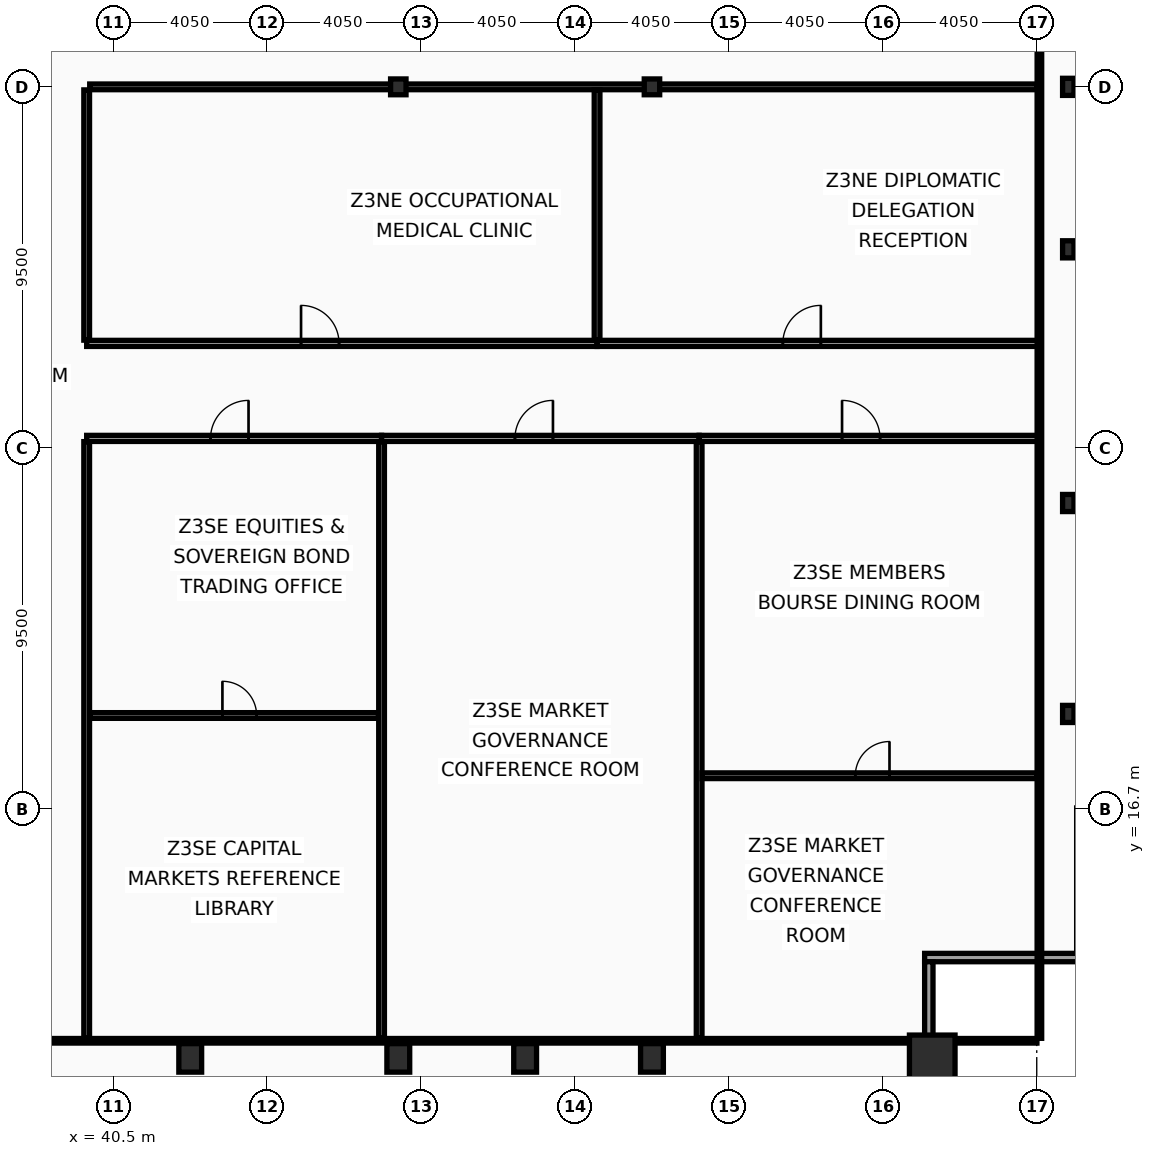
"""IFC4 building model, lengths in metres.
Left out: names, types, materials, properties, quantities, classifications, styles, units other than length and angle.
Written with IfcOpenShell. Run it as: python <this file> out.ifc"""

import sys

from ifc_helpers import new_model, si_unit, direction, frame, frame_2d, origin, origin_2d, place, context, subcontext, project, spatial, rectangle, hollow_rectangle, i_section, extrude, element, fill, save


model = new_model("IFC4")
c1 = context("Model", 3, precision=1e-05, world=origin(), true_north=direction((0.0, 1.0)))
c2 = subcontext(c1, "Body", "Model", "MODEL_VIEW")
j1 = project(units=[si_unit("LENGTHUNIT", "METRE"), si_unit("PLANEANGLEUNIT", "RADIAN")], contexts=[c1])
p1 = place(None, origin())
s1 = spatial("IfcSite", under=j1, at=p1, CompositionType="ELEMENT")
p2 = place(p1, origin())
s2 = spatial("IfcBuilding", under=s1, at=p2, CompositionType="ELEMENT")
p3 = place(p2, frame((0.0, 0.0, 199.4)))
s3 = spatial("IfcBuildingStorey", under=s2, at=p3, CompositionType="ELEMENT", Elevation=199.4)
p4 = place(p3, frame((62.05, 10.15, 0.0), z_axis=(0.0, 0.0, 1.0), x_axis=(1.0, 0.0, 0.0)))
e1 = element("IfcColumn", 1, at=p4, inside=s3, PredefinedType="COLUMN", context=c2, shape_type="SweptSolid", body=[
    extrude(hollow_rectangle(XDim=1.2, YDim=1.2, WallThickness=0.06, at=origin_2d()), origin(), (0.0, 0.0, 1.0), 3.6),
])
for number, where, z_axis, x_axis in (
    (2, (42.525, 10.15, 0.0), (0.0, 0.0, 1.0), (1.0, 0.0, 0.0)),
    (3, (48.0, 10.15, 0.0), (0.0, 0.0, 1.0), (1.0, 0.0, 0.0)),
    (4, (51.337, 10.15, 0.0), (0.0, 0.0, 1.0), (1.0, 0.0, 0.0)),
    (5, (54.675, 10.15, 0.0), (0.0, 0.0, 1.0), (1.0, 0.0, 0.0)),
):
    element("IfcColumn", number, at=place(p3, frame(where, z_axis=z_axis, x_axis=x_axis)), inside=s3, PredefinedType="COLUMN", context=c2, shape_type="SweptSolid", body=[
        extrude(hollow_rectangle(XDim=0.6, YDim=0.75, WallThickness=0.045, at=origin_2d()), origin(), (0.0, 0.0, 1.0), 3.6),
    ])
for number, where, z_axis, x_axis in (
    (6, (65.63, 19.2, 0.0), (0.0, 0.0, 1.0), (1.0, 0.0, 0.0)),
    (7, (65.63, 24.75, 0.0), (0.0, 0.0, 1.0), (1.0, 0.0, 0.0)),
    (8, (65.63, 31.425, 0.0), (0.0, 0.0, 1.0), (1.0, 0.0, 0.0)),
    (9, (65.63, 35.7, 0.0), (0.0, 0.0, 1.0), (1.0, 0.0, 0.0)),
):
    element("IfcColumn", number, at=place(p3, frame(where, z_axis=z_axis, x_axis=x_axis)), inside=s3, PredefinedType="COLUMN", context=c2, shape_type="SweptSolid", body=[
        extrude(i_section(OverallWidth=0.3, OverallDepth=0.45, WebThickness=0.014, FlangeThickness=0.026, at=origin_2d()), origin(), (0.0, 0.0, 1.0), 3.6),
    ])
for number, where, z_axis, x_axis in (
    (10, (48.0, 35.7, 0.0), (0.0, 0.0, 1.0), (1.0, 0.0, 0.0)),
    (11, (54.675, 35.7, 0.0), (0.0, 0.0, 1.0), (1.0, 0.0, 0.0)),
):
    element("IfcColumn", number, at=place(p3, frame(where, z_axis=z_axis, x_axis=x_axis)), inside=s3, PredefinedType="COLUMN", context=c2, shape_type="SweptSolid", body=[
        extrude(i_section(OverallWidth=0.406, OverallDepth=0.416, WebThickness=0.03, FlangeThickness=0.048, at=origin_2d()), origin(), (0.0, 0.0, 1.0), 3.6),
    ])
p5 = place(p3, frame((66.07, 12.79, 0.0), z_axis=(0.0, 0.0, 1.0), x_axis=(-1.0, 0.0, 0.0)))
e12 = element("IfcWall", 12, at=p5, inside=s3, PredefinedType="SOLIDWALL", context=c2, shape_type="SweptSolid", body=[
    extrude(rectangle(XDim=4.22, YDim=0.22, at=frame_2d((2.11, 0.0))), origin(), (0.0, 0.0, 1.0), 2.83),
])
p6 = place(p3, frame((61.96, 12.68, 0.0), z_axis=(0.0, 0.0, 1.0), x_axis=(0.0, -1.0, 0.0)))
e13 = element("IfcWall", 13, at=p6, inside=s3, PredefinedType="SOLIDWALL", context=c2, shape_type="SweptSolid", body=[
    extrude(rectangle(XDim=3.91, YDim=0.22, at=frame_2d((1.955, 0.0))), origin(), (0.0, 0.0, 1.0), 2.83),
])
p7 = place(p3, frame((39.8, 10.665, 0.0), z_axis=(0.0, 0.0, 1.0), x_axis=(0.0, 1.0, 0.0)))
e14 = element("IfcWall", 14, at=p7, inside=s3, PredefinedType="PARTITIONING", context=c2, shape_type="SweptSolid", body=[
    extrude(rectangle(XDim=15.7, YDim=0.15, at=frame_2d((7.85, 0.0))), origin(), (0.0, 0.0, 1.0), 2.98),
])
p8 = place(p3, frame((39.8, 29.035, 0.0), z_axis=(0.0, 0.0, 1.0), x_axis=(0.0, 1.0, 0.0)))
e15 = element("IfcWall", 15, at=p8, inside=s3, PredefinedType="PARTITIONING", context=c2, shape_type="SweptSolid", body=[
    extrude(rectangle(XDim=6.585, YDim=0.15, at=frame_2d((3.292, 0.0))), origin(), (0.0, 0.0, 1.0), 2.98),
])
p9 = place(p3, frame((39.88, 35.7, 0.0), z_axis=(0.0, 0.0, 1.0), x_axis=(1.0, 0.0, 0.0)))
e16 = element("IfcWall", 16, at=p9, inside=s3, PredefinedType="PARTITIONING", context=c2, shape_type="SweptSolid", body=[
    extrude(rectangle(XDim=24.925, YDim=0.15, at=frame_2d((12.462, 0.0))), origin(), (0.0, 0.0, 1.0), 2.73),
])
p10 = place(p3, frame((39.8, 26.45, 0.0), z_axis=(0.0, 0.0, 1.0), x_axis=(1.0, 0.0, 0.0)))
e17 = element("IfcWall", 17, at=p10, inside=s3, PredefinedType="PARTITIONING", context=c2, shape_type="SweptSolid", body=[
    extrude(rectangle(XDim=7.76, YDim=0.16, at=frame_2d((3.88, 0.0))), origin(), (0.0, 0.0, 1.0), 2.73),
])
p11 = place(p10, frame((3.259, 0.0, 0.0)))
e18 = element("IfcOpeningElement", 18, at=p11, cuts=e17, PredefinedType="OPENING", context=c2, shape_type="SweptSolid", body=[
    extrude(rectangle(XDim=1.0, YDim=2.05, at=frame_2d((0.5, 1.025))), frame((0.0, 0.09, 0.0), z_axis=(0.0, -1.0, 0.0), x_axis=(1.0, 0.0, 0.0)), (0.0, 0.0, 1.0), 0.18),
])
p12 = place(p3, frame((39.88, 19.159, 0.0), z_axis=(0.0, 0.0, 1.0), x_axis=(1.0, 0.0, 0.0)))
e19 = element("IfcWall", 19, at=p12, inside=s3, PredefinedType="PARTITIONING", context=c2, shape_type="SweptSolid", body=[
    extrude(rectangle(XDim=7.6, YDim=0.15, at=frame_2d((3.8, 0.0))), origin(), (0.0, 0.0, 1.0), 2.73),
])
p13 = place(p12, frame((3.492, 0.0, 0.0)))
e20 = element("IfcOpeningElement", 20, at=p13, cuts=e19, PredefinedType="OPENING", context=c2, shape_type="SweptSolid", body=[
    extrude(rectangle(XDim=0.9, YDim=2.05, at=frame_2d((0.45, 1.025))), frame((0.0, 0.085, 0.0), z_axis=(0.0, -1.0, 0.0), x_axis=(1.0, 0.0, 0.0)), (0.0, 0.0, 1.0), 0.17),
])
p14 = place(p3, frame((47.56, 26.45, 0.0), z_axis=(0.0, 0.0, 1.0), x_axis=(1.0, 0.0, 0.0)))
e21 = element("IfcWall", 21, at=p14, inside=s3, PredefinedType="PARTITIONING", context=c2, shape_type="SweptSolid", body=[
    extrude(rectangle(XDim=8.357, YDim=0.16, at=frame_2d((4.178, 0.0))), origin(), (0.0, 0.0, 1.0), 2.73),
])
p15 = place(p14, frame((3.51, 0.0, 0.0)))
e22 = element("IfcOpeningElement", 22, at=p15, cuts=e21, PredefinedType="OPENING", context=c2, shape_type="SweptSolid", body=[
    extrude(rectangle(XDim=1.0, YDim=2.05, at=frame_2d((0.5, 1.025))), frame((0.0, 0.09, 0.0), z_axis=(0.0, -1.0, 0.0), x_axis=(1.0, 0.0, 0.0)), (0.0, 0.0, 1.0), 0.18),
])
p16 = place(p3, frame((47.56, 10.665, 0.0), z_axis=(0.0, 0.0, 1.0), x_axis=(0.0, 1.0, 0.0)))
e23 = element("IfcWall", 23, at=p16, inside=s3, PredefinedType="PARTITIONING", context=c2, shape_type="SweptSolid", body=[
    extrude(rectangle(XDim=15.7, YDim=0.15, at=frame_2d((7.85, 0.0))), origin(), (0.0, 0.0, 1.0), 2.73),
])
p17 = place(p3, frame((55.917, 26.45, 0.0), z_axis=(0.0, 0.0, 1.0), x_axis=(1.0, 0.0, 0.0)))
e24 = element("IfcWall", 24, at=p17, inside=s3, PredefinedType="PARTITIONING", context=c2, shape_type="SweptSolid", body=[
    extrude(rectangle(XDim=8.954, YDim=0.16, at=frame_2d((4.477, 0.0))), origin(), (0.0, 0.0, 1.0), 3.44),
])
p18 = place(p17, frame((3.76, 0.0, 0.0)))
e25 = element("IfcOpeningElement", 25, at=p18, cuts=e24, PredefinedType="OPENING", context=c2, shape_type="SweptSolid", body=[
    extrude(rectangle(XDim=1.0, YDim=2.05, at=frame_2d((0.5, 1.025))), frame((0.0, 0.09, 0.0), z_axis=(0.0, -1.0, 0.0), x_axis=(1.0, 0.0, 0.0)), (0.0, 0.0, 1.0), 0.18),
])
p19 = place(p3, frame((55.917, 10.665, 0.0), z_axis=(0.0, 0.0, 1.0), x_axis=(0.0, 1.0, 0.0)))
e26 = element("IfcWall", 26, at=p19, inside=s3, PredefinedType="PARTITIONING", context=c2, shape_type="SweptSolid", body=[
    extrude(rectangle(XDim=15.7, YDim=0.15, at=frame_2d((7.85, 0.0))), origin(), (0.0, 0.0, 1.0), 2.73),
])
p20 = place(p3, frame((55.996, 17.574, 0.0), z_axis=(0.0, 0.0, 1.0), x_axis=(1.0, 0.0, 0.0)))
e27 = element("IfcWall", 27, at=p20, inside=s3, PredefinedType="PARTITIONING", context=c2, shape_type="SweptSolid", body=[
    extrude(rectangle(XDim=8.809, YDim=0.15, at=frame_2d((4.404, 0.0))), origin(), (0.0, 0.0, 1.0), 2.83),
])
p21 = place(p20, frame((4.029, 0.0, 0.0)))
e28 = element("IfcOpeningElement", 28, at=p21, cuts=e27, PredefinedType="OPENING", context=c2, shape_type="SweptSolid", body=[
    extrude(rectangle(XDim=0.9, YDim=2.05, at=frame_2d((0.45, 1.025))), frame((0.0, 0.085, 0.0), z_axis=(0.0, -1.0, 0.0), x_axis=(1.0, 0.0, 0.0)), (0.0, 0.0, 1.0), 0.17),
])
p22 = place(p3, frame((39.8, 28.95, 0.0), z_axis=(0.0, 0.0, 1.0), x_axis=(1.0, 0.0, 0.0)))
e29 = element("IfcWall", 29, at=p22, inside=s3, PredefinedType="PARTITIONING", context=c2, shape_type="SweptSolid", body=[
    extrude(rectangle(XDim=13.43, YDim=0.16, at=frame_2d((6.715, 0.0))), origin(), (0.0, 0.0, 1.0), 2.73),
])
p23 = place(p22, frame((5.641, 0.0, 0.0)))
e30 = element("IfcOpeningElement", 30, at=p23, cuts=e29, PredefinedType="OPENING", context=c2, shape_type="SweptSolid", body=[
    extrude(rectangle(XDim=1.0, YDim=2.05, at=frame_2d((0.5, 1.025))), frame((0.0, 0.09, 0.0), z_axis=(0.0, -1.0, 0.0), x_axis=(1.0, 0.0, 0.0)), (0.0, 0.0, 1.0), 0.18),
])
p24 = place(p3, frame((53.23, 28.95, 0.0), z_axis=(0.0, 0.0, 1.0), x_axis=(1.0, 0.0, 0.0)))
e31 = element("IfcWall", 31, at=p24, inside=s3, PredefinedType="PARTITIONING", context=c2, shape_type="SweptSolid", body=[
    extrude(rectangle(XDim=11.64, YDim=0.16, at=frame_2d((5.82, 0.0))), origin(), (0.0, 0.0, 1.0), 2.73),
])
p25 = place(p24, frame((4.889, 0.0, 0.0)))
e32 = element("IfcOpeningElement", 32, at=p25, cuts=e31, PredefinedType="OPENING", context=c2, shape_type="SweptSolid", body=[
    extrude(rectangle(XDim=1.0, YDim=2.05, at=frame_2d((0.5, 1.025))), frame((0.0, 0.09, 0.0), z_axis=(0.0, -1.0, 0.0), x_axis=(1.0, 0.0, 0.0)), (0.0, 0.0, 1.0), 0.18),
])
p26 = place(p3, frame((53.23, 29.035, 0.0), z_axis=(0.0, 0.0, 1.0), x_axis=(0.0, 1.0, 0.0)))
e33 = element("IfcWall", 33, at=p26, inside=s3, PredefinedType="PARTITIONING", context=c2, shape_type="SweptSolid", body=[
    extrude(rectangle(XDim=6.585, YDim=0.15, at=frame_2d((3.292, 0.0))), origin(), (0.0, 0.0, 1.0), 2.98),
])
p27 = place(p3, frame((64.87, 10.665, 0.0), z_axis=(0.0, 0.0, 1.0), x_axis=(0.0, 1.0, 0.0)))
e34 = element("IfcWall", 34, at=p27, inside=s3, PredefinedType="PARTITIONING", context=c2, shape_type="SweptSolid", body=[
    extrude(rectangle(XDim=42.11, YDim=0.12, at=frame_2d((21.055, 0.0))), origin(), (0.0, 0.0, 1.0), 2.73),
])
p28 = place(p3, frame((8.095, 10.6, 0.0), z_axis=(0.0, 0.0, 1.0), x_axis=(1.0, 0.0, 0.0)))
e35 = element("IfcWall", 35, at=p28, inside=s3, PredefinedType="PARTITIONING", context=c2, shape_type="SweptSolid", body=[
    extrude(rectangle(XDim=56.71, YDim=0.12, at=frame_2d((28.355, 0.0))), origin(), (0.0, 0.0, 1.0), 2.73),
])
p29 = place(p11, origin())
e36 = element("IfcDoor", 36, at=p29, inside=s3, OperationType="SINGLE_SWING_RIGHT", PredefinedType="DOOR", context=c2, shape_type="SweptSolid", body=[
    extrude(rectangle(XDim=1.0, YDim=2.05, at=frame_2d((0.5, 1.025))), frame((0.0, 0.025, 0.0), z_axis=(0.0, -1.0, 0.0), x_axis=(1.0, 0.0, 0.0)), (0.0, 0.0, 1.0), 0.05),
])
fill(e18, e36)
p30 = place(p13, origin())
e37 = element("IfcDoor", 37, at=p30, inside=s3, OperationType="SINGLE_SWING_LEFT", PredefinedType="DOOR", context=c2, shape_type="SweptSolid", body=[
    extrude(rectangle(XDim=0.9, YDim=2.05, at=frame_2d((0.45, 1.025))), frame((0.0, 0.025, 0.0), z_axis=(0.0, -1.0, 0.0), x_axis=(1.0, 0.0, 0.0)), (0.0, 0.0, 1.0), 0.05),
])
fill(e20, e37)
p31 = place(p15, origin())
e38 = element("IfcDoor", 38, at=p31, inside=s3, OperationType="SINGLE_SWING_RIGHT", PredefinedType="DOOR", context=c2, shape_type="SweptSolid", body=[
    extrude(rectangle(XDim=1.0, YDim=2.05, at=frame_2d((0.5, 1.025))), frame((0.0, 0.025, 0.0), z_axis=(0.0, -1.0, 0.0), x_axis=(1.0, 0.0, 0.0)), (0.0, 0.0, 1.0), 0.05),
])
fill(e22, e38)
p32 = place(p18, origin())
e39 = element("IfcDoor", 39, at=p32, inside=s3, OperationType="SINGLE_SWING_LEFT", PredefinedType="DOOR", context=c2, shape_type="SweptSolid", body=[
    extrude(rectangle(XDim=1.0, YDim=2.05, at=frame_2d((0.5, 1.025))), frame((0.0, 0.025, 0.0), z_axis=(0.0, -1.0, 0.0), x_axis=(1.0, 0.0, 0.0)), (0.0, 0.0, 1.0), 0.05),
])
fill(e25, e39)
p33 = place(p21, origin())
e40 = element("IfcDoor", 40, at=p33, inside=s3, OperationType="SINGLE_SWING_RIGHT", PredefinedType="DOOR", context=c2, shape_type="SweptSolid", body=[
    extrude(rectangle(XDim=0.9, YDim=2.05, at=frame_2d((0.45, 1.025))), frame((0.0, 0.025, 0.0), z_axis=(0.0, -1.0, 0.0), x_axis=(1.0, 0.0, 0.0)), (0.0, 0.0, 1.0), 0.05),
])
fill(e28, e40)
p34 = place(p23, origin())
e41 = element("IfcDoor", 41, at=p34, inside=s3, OperationType="SINGLE_SWING_LEFT", PredefinedType="DOOR", context=c2, shape_type="SweptSolid", body=[
    extrude(rectangle(XDim=1.0, YDim=2.05, at=frame_2d((0.5, 1.025))), frame((0.0, 0.025, 0.0), z_axis=(0.0, -1.0, 0.0), x_axis=(1.0, 0.0, 0.0)), (0.0, 0.0, 1.0), 0.05),
])
fill(e30, e41)
p35 = place(p25, origin())
e42 = element("IfcDoor", 42, at=p35, inside=s3, OperationType="SINGLE_SWING_RIGHT", PredefinedType="DOOR", context=c2, shape_type="SweptSolid", body=[
    extrude(rectangle(XDim=1.0, YDim=2.05, at=frame_2d((0.5, 1.025))), frame((0.0, 0.025, 0.0), z_axis=(0.0, -1.0, 0.0), x_axis=(1.0, 0.0, 0.0)), (0.0, 0.0, 1.0), 0.05),
])
fill(e32, e42)
save(model, sys.argv[1])
